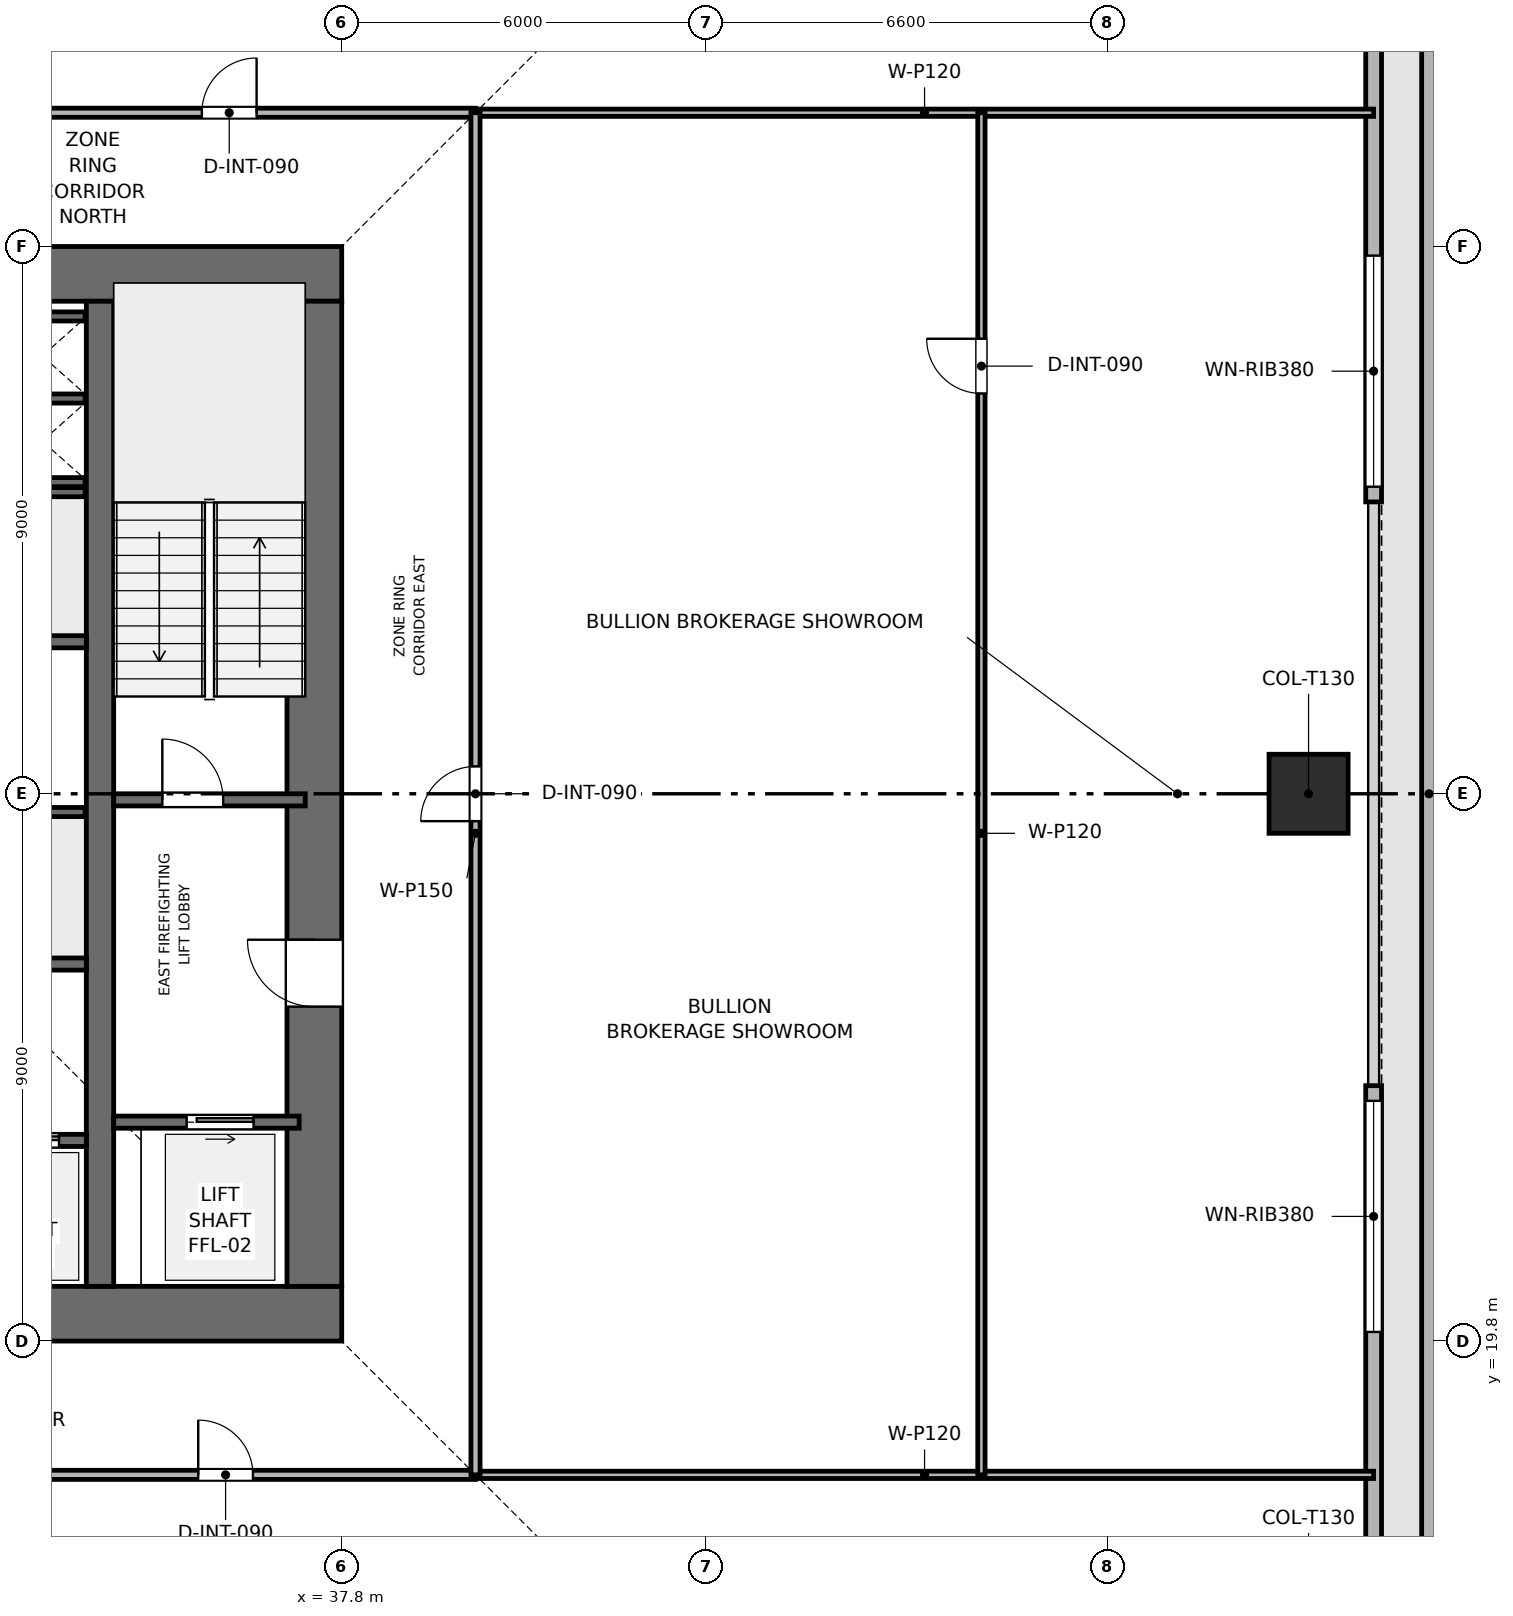
"""IFC4 building model, lengths in metres.
Left out: names, types, materials, properties, quantities, classifications, styles, units other than length and angle.
Written with IfcOpenShell. Run it as: python <this file> out.ifc"""

import sys

from ifc_helpers import new_model, si_unit, direction, frame, frame_2d, origin, origin_2d, place, context, subcontext, project, spatial, rectangle, extrude, element, fill, save


model = new_model("IFC4")
c1 = context("Model", 3, precision=1e-05, world=origin(), true_north=direction((0.0, 1.0)))
c2 = subcontext(c1, "Body", "Model", "MODEL_VIEW")
j1 = project(units=[si_unit("LENGTHUNIT", "METRE"), si_unit("PLANEANGLEUNIT", "RADIAN")], contexts=[c1])
p1 = place(None, origin())
s1 = spatial("IfcSite", under=j1, at=p1, CompositionType="ELEMENT")
p2 = place(p1, origin())
s2 = spatial("IfcBuilding", under=s1, at=p2, CompositionType="ELEMENT")
p3 = place(p2, frame((0.0, 0.0, 113.4)))
s3 = spatial("IfcBuildingStorey", under=s2, at=p3, CompositionType="ELEMENT", Elevation=113.4)
p4 = place(p3, frame((19.8, 20.25, 0.0), z_axis=(0.0, 0.0, 1.0), x_axis=(1.0, 0.0, 0.0)))
e1 = element("IfcWall", 1, at=p4, inside=s3, PredefinedType="SHEAR", context=c2, shape_type="SweptSolid", body=[
    extrude(rectangle(XDim=18.0, YDim=0.9, at=frame_2d((9.0, 0.0))), origin(), (0.0, 0.0, 1.0), 3.9),
])
p5 = place(p4, frame((8.4, 0.0, 0.0)))
e2 = element("IfcOpeningElement", 2, at=p5, cuts=e1, PredefinedType="OPENING", context=c2, shape_type="SweptSolid", body=[
    extrude(rectangle(XDim=1.2, YDim=2.2, at=frame_2d((0.6, 1.1))), frame((0.0, 0.46, 0.0), z_axis=(0.0, -1.0, 0.0), x_axis=(1.0, 0.0, 0.0)), (0.0, 0.0, 1.0), 0.92),
])
p6 = place(p3, frame((19.8, 37.35, 0.0), z_axis=(0.0, 0.0, 1.0), x_axis=(1.0, 0.0, 0.0)))
e3 = element("IfcWall", 3, at=p6, inside=s3, PredefinedType="SHEAR", context=c2, shape_type="SweptSolid", body=[
    extrude(rectangle(XDim=18.0, YDim=0.9, at=frame_2d((9.0, 0.0))), origin(), (0.0, 0.0, 1.0), 3.9),
])
p7 = place(p6, frame((7.05, 0.0, 0.0)))
e4 = element("IfcOpeningElement", 4, at=p7, cuts=e3, PredefinedType="OPENING", context=c2, shape_type="SweptSolid", body=[
    extrude(rectangle(XDim=1.1, YDim=2.15, at=frame_2d((0.55, 1.075))), frame((0.0, 0.46, 0.0), z_axis=(0.0, -1.0, 0.0), x_axis=(1.0, 0.0, 0.0)), (0.0, 0.0, 1.0), 0.92),
])
p8 = place(p3, frame((37.35, 20.7, 0.0), z_axis=(0.0, 0.0, 1.0), x_axis=(0.0, 1.0, 0.0)))
e5 = element("IfcWall", 5, at=p8, inside=s3, PredefinedType="SHEAR", context=c2, shape_type="SweptSolid", body=[
    extrude(rectangle(XDim=16.2, YDim=0.9, at=frame_2d((8.1, 0.0))), origin(), (0.0, 0.0, 1.0), 3.9),
])
p9 = place(p8, frame((4.6, 0.0, 0.0)))
e6 = element("IfcOpeningElement", 6, at=p9, cuts=e5, PredefinedType="OPENING", context=c2, shape_type="SweptSolid", body=[
    extrude(rectangle(XDim=1.1, YDim=2.15, at=frame_2d((0.55, 1.075))), frame((0.0, 0.46, 0.0), z_axis=(0.0, -1.0, 0.0), x_axis=(1.0, 0.0, 0.0)), (0.0, 0.0, 1.0), 0.92),
])
p10 = place(p3, frame((33.825, 20.7, 0.0), z_axis=(0.0, 0.0, 1.0), x_axis=(0.0, 1.0, 0.0)))
e7 = element("IfcWall", 7, at=p10, inside=s3, PredefinedType="SHEAR", context=c2, shape_type="SweptSolid", body=[
    extrude(rectangle(XDim=16.2, YDim=0.45, at=frame_2d((8.1, 0.0))), origin(), (0.0, 0.0, 1.0), 3.9),
])
p11 = place(p3, frame((53.7, 28.8, 0.003), z_axis=(0.0, 0.0, 1.0), x_axis=(1.0, 0.0, 0.0)))
e8 = element("IfcColumn", 8, at=p11, inside=s3, PredefinedType="COLUMN", context=c2, shape_type="SweptSolid", body=[
    extrude(rectangle(XDim=1.3, YDim=1.3, at=origin_2d()), origin(), (0.0, 0.0, 1.0), 3.644),
])
p12 = place(p3, frame((55.68, 9.555, 0.0), z_axis=(0.0, 0.0, 1.0), x_axis=(0.0, 1.0, 0.0)))
e9 = element("IfcWall", 9, at=p12, inside=s3, PredefinedType="PARAPET", context=c2, shape_type="SweptSolid", body=[
    extrude(rectangle(XDim=38.49, YDim=0.24, at=frame_2d((19.245, 0.0))), origin(), (0.0, 0.0, 1.0), 1.2),
])
p13 = place(p3, frame((54.77, 47.7, 0.0), z_axis=(0.0, 0.0, 1.0), x_axis=(0.0, -1.0, 0.0)))
e10 = element("IfcWall", 10, at=p13, inside=s3, PredefinedType="SOLIDWALL", context=c2, shape_type="SweptSolid", body=[
    extrude(rectangle(XDim=14.1, YDim=0.26, at=frame_2d((7.05, 0.0))), origin(), (0.0, 0.0, 1.0), 3.65),
])
p14 = place(p13, frame((10.05, 0.0, 0.9)))
e11 = element("IfcOpeningElement", 11, at=p14, cuts=e10, PredefinedType="OPENING", context=c2, shape_type="SweptSolid", body=[
    extrude(rectangle(XDim=3.8, YDim=1.9, at=frame_2d((1.9, 0.95))), frame((0.0, 0.14, 0.0), z_axis=(0.0, -1.0, 0.0), x_axis=(1.0, 0.0, 0.0)), (0.0, 0.0, 1.0), 0.28),
])
p15 = place(p3, frame((54.77, 24.0, 0.0), z_axis=(0.0, 0.0, 1.0), x_axis=(0.0, -1.0, 0.0)))
e12 = element("IfcWall", 12, at=p15, inside=s3, PredefinedType="SOLIDWALL", context=c2, shape_type="SweptSolid", body=[
    extrude(rectangle(XDim=14.1, YDim=0.26, at=frame_2d((7.05, 0.0))), origin(), (0.0, 0.0, 1.0), 3.65),
])
p16 = place(p15, frame((0.25, 0.0, 0.9)))
e13 = element("IfcOpeningElement", 13, at=p16, cuts=e12, PredefinedType="OPENING", context=c2, shape_type="SweptSolid", body=[
    extrude(rectangle(XDim=3.8, YDim=1.9, at=frame_2d((1.9, 0.95))), frame((0.0, 0.14, 0.0), z_axis=(0.0, -1.0, 0.0), x_axis=(1.0, 0.0, 0.0)), (0.0, 0.0, 1.0), 0.28),
])
p17 = place(p3, frame((34.05, 28.7, 0.0), z_axis=(0.0, 0.0, 1.0), x_axis=(1.0, 0.0, 0.0)))
e14 = element("IfcWall", 14, at=p17, inside=s3, PredefinedType="SHEAR", context=c2, shape_type="SweptSolid", body=[
    extrude(rectangle(XDim=3.15, YDim=0.2, at=frame_2d((1.575, 0.0))), origin(), (0.0, 0.0, 1.0), 3.65),
])
p18 = place(p17, frame((0.8, 0.0, 0.0)))
e15 = element("IfcOpeningElement", 15, at=p18, cuts=e14, PredefinedType="OPENING", context=c2, shape_type="SweptSolid", body=[
    extrude(rectangle(XDim=1.0, YDim=2.1, at=frame_2d((0.5, 1.05))), frame((0.0, 0.11, 0.0), z_axis=(0.0, -1.0, 0.0), x_axis=(1.0, 0.0, 0.0)), (0.0, 0.0, 1.0), 0.22),
])
for number, where, z_axis, x_axis in (
    (16, (32.25, 33.925, 0.0), (0.0, 0.0, 1.0), (1.0, 0.0, 0.0)),
    (17, (32.25, 35.3, 0.0), (0.0, 0.0, 1.0), (1.0, 0.0, 0.0)),
):
    element("IfcWall", number, at=place(p3, frame(where, z_axis=z_axis, x_axis=x_axis)), inside=s3, PredefinedType="SHEAR", context=c2, shape_type="SweptSolid", body=[
        extrude(rectangle(XDim=1.33, YDim=0.15, at=frame_2d((0.665, 0.0))), origin(), (0.0, 0.0, 1.0), 3.65),
    ])
p19 = place(p3, frame((34.05, 23.4, 0.0), z_axis=(0.0, 0.0, 1.0), x_axis=(1.0, 0.0, 0.0)))
e18 = element("IfcWall", 18, at=p19, inside=s3, PredefinedType="SHEAR", context=c2, shape_type="SweptSolid", body=[
    extrude(rectangle(XDim=3.05, YDim=0.2, at=frame_2d((1.525, 0.0))), origin(), (0.0, 0.0, 1.0), 3.65),
])
p20 = place(p19, frame((1.2, 0.0, 0.0)))
e19 = element("IfcOpeningElement", 19, at=p20, cuts=e18, PredefinedType="OPENING", context=c2, shape_type="SweptSolid", body=[
    extrude(rectangle(XDim=1.1, YDim=2.15, at=frame_2d((0.55, 1.075))), frame((0.0, 0.11, 0.0), z_axis=(0.0, -1.0, 0.0), x_axis=(1.0, 0.0, 0.0)), (0.0, 0.0, 1.0), 0.22),
])
p21 = place(p3, frame((31.6, 23.1, 0.0), z_axis=(0.0, 0.0, 1.0), x_axis=(1.0, 0.0, 0.0)))
e20 = element("IfcWall", 20, at=p21, inside=s3, PredefinedType="SHEAR", context=c2, shape_type="SweptSolid", body=[
    extrude(rectangle(XDim=2.0, YDim=0.2, at=frame_2d((1.0, 0.0))), origin(), (0.0, 0.0, 1.0), 3.65),
])
p22 = place(p21, frame((0.45, 0.0, 0.0)))
e21 = element("IfcOpeningElement", 21, at=p22, cuts=e20, PredefinedType="OPENING", context=c2, shape_type="SweptSolid", body=[
    extrude(rectangle(XDim=1.1, YDim=2.15, at=frame_2d((0.55, 1.075))), frame((0.0, 0.11, 0.0), z_axis=(0.0, -1.0, 0.0), x_axis=(1.0, 0.0, 0.0)), (0.0, 0.0, 1.0), 0.22),
])
for number, where, z_axis, x_axis in (
    (22, (31.6, 26.0, 0.0), (0.0, 0.0, 1.0), (1.0, 0.0, 0.0)),
    (23, (31.6, 31.3, 0.0), (0.0, 0.0, 1.0), (1.0, 0.0, 0.0)),
):
    element("IfcWall", number, at=place(p3, frame(where, z_axis=z_axis, x_axis=x_axis)), inside=s3, PredefinedType="SHEAR", context=c2, shape_type="SweptSolid", body=[
        extrude(rectangle(XDim=2.0, YDim=0.2, at=frame_2d((1.0, 0.0))), origin(), (0.0, 0.0, 1.0), 3.65),
    ])
p23 = place(p3, frame((32.25, 36.65, 0.0), z_axis=(0.0, 0.0, 1.0), x_axis=(1.0, 0.0, 0.0)))
e24 = element("IfcWall", 24, at=p23, inside=s3, PredefinedType="SHEAR", context=c2, shape_type="SweptSolid", body=[
    extrude(rectangle(XDim=1.33, YDim=0.15, at=frame_2d((0.665, 0.0))), origin(), (0.0, 0.0, 1.0), 3.65),
])
for number, where, z_axis, x_axis in (
    (25, (29.5, 28.5, 0.0), (0.0, 0.0, 1.0), (1.0, 0.0, 0.0)),
    (26, (29.5, 33.76, 0.0), (0.0, 0.0, 1.0), (1.0, 0.0, 0.0)),
):
    element("IfcWall", number, at=place(p3, frame(where, z_axis=z_axis, x_axis=x_axis)), inside=s3, PredefinedType="SHEAR", context=c2, shape_type="SweptSolid", body=[
        extrude(rectangle(XDim=4.08, YDim=0.15, at=frame_2d((2.04, 0.0))), origin(), (0.0, 0.0, 1.0), 3.65),
    ])
for number, where, z_axis, x_axis in (
    (27, (40.0, 17.6, 0.0), (0.0, 0.0, 1.0), (1.0, 0.0, 0.0)),
    (28, (40.0, 40.0, 0.0), (0.0, 0.0, 1.0), (1.0, 0.0, 0.0)),
):
    element("IfcWall", number, at=place(p3, frame(where, z_axis=z_axis, x_axis=x_axis)), inside=s3, PredefinedType="PARTITIONING", context=c2, shape_type="SweptSolid", body=[
        extrude(rectangle(XDim=14.77, YDim=0.12, at=frame_2d((7.385, 0.0))), origin(), (0.0, 0.0, 1.0), 3.035),
    ])
p24 = place(p3, frame((48.32, 17.6, 0.0), z_axis=(0.0, 0.0, 1.0), x_axis=(0.0, 1.0, 0.0)))
e29 = element("IfcWall", 29, at=p24, inside=s3, PredefinedType="PARTITIONING", context=c2, shape_type="SweptSolid", body=[
    extrude(rectangle(XDim=22.4, YDim=0.12, at=frame_2d((11.2, 0.0))), origin(), (0.0, 0.0, 1.0), 3.185),
])
p25 = place(p24, frame((17.783, 0.0, 0.0)))
e30 = element("IfcOpeningElement", 30, at=p25, cuts=e29, PredefinedType="OPENING", context=c2, shape_type="SweptSolid", body=[
    extrude(rectangle(XDim=0.9, YDim=2.1, at=frame_2d((0.45, 1.05))), frame((0.0, 0.07, 0.0), z_axis=(0.0, -1.0, 0.0), x_axis=(1.0, 0.0, 0.0)), (0.0, 0.0, 1.0), 0.14),
])
p26 = place(p3, frame((17.6, 17.6, 0.0), z_axis=(0.0, 0.0, 1.0), x_axis=(1.0, 0.0, 0.0)))
e31 = element("IfcWall", 31, at=p26, inside=s3, PredefinedType="PARTITIONING", context=c2, shape_type="SweptSolid", body=[
    extrude(rectangle(XDim=22.4, YDim=0.15, at=frame_2d((11.2, 0.0))), origin(), (0.0, 0.0, 1.0), 3.185),
])
p27 = place(p26, frame((0.7, 0.0, 0.0)))
e32 = element("IfcOpeningElement", 32, at=p27, cuts=e31, PredefinedType="OPENING", context=c2, shape_type="SweptSolid", body=[
    extrude(rectangle(XDim=0.9, YDim=2.1, at=frame_2d((0.45, 1.05))), frame((0.0, 0.085, 0.0), z_axis=(0.0, -1.0, 0.0), x_axis=(1.0, 0.0, 0.0)), (0.0, 0.0, 1.0), 0.17),
])
p28 = place(p26, frame((4.907, 0.0, 0.0)))
e33 = element("IfcOpeningElement", 33, at=p28, cuts=e31, PredefinedType="OPENING", context=c2, shape_type="SweptSolid", body=[
    extrude(rectangle(XDim=0.9, YDim=2.1, at=frame_2d((0.45, 1.05))), frame((0.0, 0.085, 0.0), z_axis=(0.0, -1.0, 0.0), x_axis=(1.0, 0.0, 0.0)), (0.0, 0.0, 1.0), 0.17),
])
p29 = place(p26, frame((10.848, 0.0, 0.0)))
e34 = element("IfcOpeningElement", 34, at=p29, cuts=e31, PredefinedType="OPENING", context=c2, shape_type="SweptSolid", body=[
    extrude(rectangle(XDim=0.9, YDim=2.1, at=frame_2d((0.45, 1.05))), frame((0.0, 0.085, 0.0), z_axis=(0.0, -1.0, 0.0), x_axis=(1.0, 0.0, 0.0)), (0.0, 0.0, 1.0), 0.17),
])
p30 = place(p26, frame((17.84, 0.0, 0.0)))
e35 = element("IfcOpeningElement", 35, at=p30, cuts=e31, PredefinedType="OPENING", context=c2, shape_type="SweptSolid", body=[
    extrude(rectangle(XDim=0.9, YDim=2.1, at=frame_2d((0.45, 1.05))), frame((0.0, 0.085, 0.0), z_axis=(0.0, -1.0, 0.0), x_axis=(1.0, 0.0, 0.0)), (0.0, 0.0, 1.0), 0.17),
])
p31 = place(p3, frame((17.6, 40.0, 0.0), z_axis=(0.0, 0.0, 1.0), x_axis=(1.0, 0.0, 0.0)))
e36 = element("IfcWall", 36, at=p31, inside=s3, PredefinedType="PARTITIONING", context=c2, shape_type="SweptSolid", body=[
    extrude(rectangle(XDim=22.4, YDim=0.15, at=frame_2d((11.2, 0.0))), origin(), (0.0, 0.0, 1.0), 3.185),
])
p32 = place(p31, frame((2.5, 0.0, 0.0)))
e37 = element("IfcOpeningElement", 37, at=p32, cuts=e36, PredefinedType="OPENING", context=c2, shape_type="SweptSolid", body=[
    extrude(rectangle(XDim=0.9, YDim=2.1, at=frame_2d((0.45, 1.05))), frame((0.0, 0.085, 0.0), z_axis=(0.0, -1.0, 0.0), x_axis=(1.0, 0.0, 0.0)), (0.0, 0.0, 1.0), 0.17),
])
p33 = place(p31, frame((6.85, 0.0, 0.0)))
e38 = element("IfcOpeningElement", 38, at=p33, cuts=e36, PredefinedType="OPENING", context=c2, shape_type="SweptSolid", body=[
    extrude(rectangle(XDim=0.9, YDim=2.1, at=frame_2d((0.45, 1.05))), frame((0.0, 0.085, 0.0), z_axis=(0.0, -1.0, 0.0), x_axis=(1.0, 0.0, 0.0)), (0.0, 0.0, 1.0), 0.17),
])
p34 = place(p31, frame((9.75, 0.0, 0.0)))
e39 = element("IfcOpeningElement", 39, at=p34, cuts=e36, PredefinedType="OPENING", context=c2, shape_type="SweptSolid", body=[
    extrude(rectangle(XDim=0.9, YDim=2.1, at=frame_2d((0.45, 1.05))), frame((0.0, 0.085, 0.0), z_axis=(0.0, -1.0, 0.0), x_axis=(1.0, 0.0, 0.0)), (0.0, 0.0, 1.0), 0.17),
])
p35 = place(p31, frame((12.5, 0.0, 0.0)))
e40 = element("IfcOpeningElement", 40, at=p35, cuts=e36, PredefinedType="OPENING", context=c2, shape_type="SweptSolid", body=[
    extrude(rectangle(XDim=0.95, YDim=2.1, at=frame_2d((0.475, 1.05))), frame((0.0, 0.085, 0.0), z_axis=(0.0, -1.0, 0.0), x_axis=(1.0, 0.0, 0.0)), (0.0, 0.0, 1.0), 0.17),
])
p36 = place(p31, frame((17.9, 0.0, 0.0)))
e41 = element("IfcOpeningElement", 41, at=p36, cuts=e36, PredefinedType="OPENING", context=c2, shape_type="SweptSolid", body=[
    extrude(rectangle(XDim=0.9, YDim=2.1, at=frame_2d((0.45, 1.05))), frame((0.0, 0.085, 0.0), z_axis=(0.0, -1.0, 0.0), x_axis=(1.0, 0.0, 0.0)), (0.0, 0.0, 1.0), 0.17),
])
p37 = place(p3, frame((40.0, 17.6, 0.0), z_axis=(0.0, 0.0, 1.0), x_axis=(0.0, 1.0, 0.0)))
e42 = element("IfcWall", 42, at=p37, inside=s3, PredefinedType="PARTITIONING", context=c2, shape_type="SweptSolid", body=[
    extrude(rectangle(XDim=22.4, YDim=0.15, at=frame_2d((11.2, 0.0))), origin(), (0.0, 0.0, 1.0), 3.185),
])
p38 = place(p37, frame((10.75, 0.0, 0.0)))
e43 = element("IfcOpeningElement", 43, at=p38, cuts=e42, PredefinedType="OPENING", context=c2, shape_type="SweptSolid", body=[
    extrude(rectangle(XDim=0.9, YDim=2.1, at=frame_2d((0.45, 1.05))), frame((0.0, 0.085, 0.0), z_axis=(0.0, -1.0, 0.0), x_axis=(1.0, 0.0, 0.0)), (0.0, 0.0, 1.0), 0.17),
])
p39 = place(p14, origin())
e44 = element("IfcWindow", 44, at=p39, inside=s3, PartitioningType="SINGLE_PANEL", PredefinedType="WINDOW", context=c2, shape_type="SweptSolid", body=[
    extrude(rectangle(XDim=3.8, YDim=1.9, at=frame_2d((1.9, 0.95))), frame((0.0, 0.03, 0.0), z_axis=(0.0, -1.0, 0.0), x_axis=(1.0, 0.0, 0.0)), (0.0, 0.0, 1.0), 0.06),
])
fill(e11, e44)
p40 = place(p16, origin())
e45 = element("IfcWindow", 45, at=p40, inside=s3, PartitioningType="SINGLE_PANEL", PredefinedType="WINDOW", context=c2, shape_type="SweptSolid", body=[
    extrude(rectangle(XDim=3.8, YDim=1.9, at=frame_2d((1.9, 0.95))), frame((0.0, 0.03, 0.0), z_axis=(0.0, -1.0, 0.0), x_axis=(1.0, 0.0, 0.0)), (0.0, 0.0, 1.0), 0.06),
])
fill(e13, e45)
p41 = place(p18, origin())
e46 = element("IfcDoor", 46, at=p41, inside=s3, OperationType="SINGLE_SWING_LEFT", PredefinedType="DOOR", context=c2, shape_type="SweptSolid", body=[
    extrude(rectangle(XDim=1.0, YDim=2.1, at=frame_2d((0.5, 1.05))), frame((0.0, 0.025, 0.0), z_axis=(0.0, -1.0, 0.0), x_axis=(1.0, 0.0, 0.0)), (0.0, 0.0, 1.0), 0.05),
])
fill(e15, e46)
p42 = place(p20, origin())
e47 = element("IfcDoor", 47, at=p42, inside=s3, OperationType="SLIDING_TO_RIGHT", PredefinedType="DOOR", context=c2, shape_type="SweptSolid", body=[
    extrude(rectangle(XDim=1.1, YDim=2.15, at=frame_2d((0.55, 1.075))), frame((0.0, 0.025, 0.0), z_axis=(0.0, -1.0, 0.0), x_axis=(1.0, 0.0, 0.0)), (0.0, 0.0, 1.0), 0.05),
])
fill(e19, e47)
p43 = place(p22, origin())
e48 = element("IfcDoor", 48, at=p43, inside=s3, OperationType="SLIDING_TO_RIGHT", PredefinedType="DOOR", context=c2, shape_type="SweptSolid", body=[
    extrude(rectangle(XDim=1.1, YDim=2.15, at=frame_2d((0.55, 1.075))), frame((0.0, 0.025, 0.0), z_axis=(0.0, -1.0, 0.0), x_axis=(1.0, 0.0, 0.0)), (0.0, 0.0, 1.0), 0.05),
])
fill(e21, e48)
p44 = place(p25, origin())
e49 = element("IfcDoor", 49, at=p44, inside=s3, OperationType="SINGLE_SWING_RIGHT", PredefinedType="DOOR", context=c2, shape_type="SweptSolid", body=[
    extrude(rectangle(XDim=0.9, YDim=2.1, at=frame_2d((0.45, 1.05))), frame((0.0, 0.025, 0.0), z_axis=(0.0, -1.0, 0.0), x_axis=(1.0, 0.0, 0.0)), (0.0, 0.0, 1.0), 0.05),
])
fill(e30, e49)
p45 = place(p30, origin())
e50 = element("IfcDoor", 50, at=p45, inside=s3, OperationType="SINGLE_SWING_LEFT", PredefinedType="DOOR", context=c2, shape_type="SweptSolid", body=[
    extrude(rectangle(XDim=0.9, YDim=2.1, at=frame_2d((0.45, 1.05))), frame((0.0, 0.025, 0.0), z_axis=(0.0, -1.0, 0.0), x_axis=(1.0, 0.0, 0.0)), (0.0, 0.0, 1.0), 0.05),
])
fill(e35, e50)
p46 = place(p36, origin())
e51 = element("IfcDoor", 51, at=p46, inside=s3, OperationType="SINGLE_SWING_RIGHT", PredefinedType="DOOR", context=c2, shape_type="SweptSolid", body=[
    extrude(rectangle(XDim=0.9, YDim=2.1, at=frame_2d((0.45, 1.05))), frame((0.0, 0.025, 0.0), z_axis=(0.0, -1.0, 0.0), x_axis=(1.0, 0.0, 0.0)), (0.0, 0.0, 1.0), 0.05),
])
fill(e41, e51)
p47 = place(p38, origin())
e52 = element("IfcDoor", 52, at=p47, inside=s3, OperationType="SINGLE_SWING_LEFT", PredefinedType="DOOR", context=c2, shape_type="SweptSolid", body=[
    extrude(rectangle(XDim=0.9, YDim=2.1, at=frame_2d((0.45, 1.05))), frame((0.0, 0.025, 0.0), z_axis=(0.0, -1.0, 0.0), x_axis=(1.0, 0.0, 0.0)), (0.0, 0.0, 1.0), 0.05),
])
fill(e43, e52)
p48 = place(p9, origin())
e53 = element("IfcDoor", 53, at=p48, inside=s3, OperationType="SINGLE_SWING_RIGHT", PredefinedType="DOOR", context=c2, shape_type="SweptSolid", body=[
    extrude(rectangle(XDim=1.1, YDim=2.15, at=frame_2d((0.55, 1.075))), frame((0.0, 0.025, 0.0), z_axis=(0.0, -1.0, 0.0), x_axis=(1.0, 0.0, 0.0)), (0.0, 0.0, 1.0), 0.05),
])
fill(e6, e53)
save(model, sys.argv[1])
